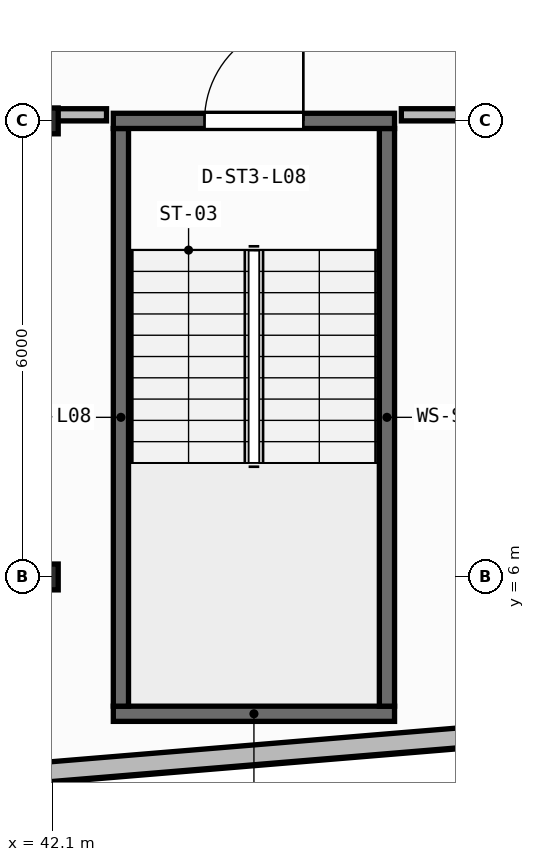
"""IFC4 building model, lengths in metres.
Left out: names, types, materials, properties, quantities, classifications, styles, units other than length and angle.
Written with IfcOpenShell. Run it as: python <this file> out.ifc"""

import sys

from ifc_helpers import new_model, si_unit, direction, frame, frame_2d, origin, origin_2d, place, context, subcontext, project, spatial, rectangle, i_section, extrude, element, fill, save


model = new_model("IFC4")
c1 = context("Model", 3, precision=1e-05, world=origin(), true_north=direction((0.0, 1.0)))
c2 = subcontext(c1, "Body", "Model", "MODEL_VIEW")
j1 = project(units=[si_unit("LENGTHUNIT", "METRE"), si_unit("PLANEANGLEUNIT", "RADIAN")], contexts=[c1])
p1 = place(None, origin())
s1 = spatial("IfcSite", under=j1, at=p1, CompositionType="ELEMENT")
p2 = place(p1, origin())
s2 = spatial("IfcBuilding", under=s1, at=p2, CompositionType="ELEMENT")
p3 = place(p2, frame((0.0, 0.0, 34.35)))
s3 = spatial("IfcBuildingStorey", under=s2, at=p3, CompositionType="ELEMENT", Elevation=34.35)
for number, where, z_axis, x_axis in (
    (1, (42.0, 6.0, 0.0), (0.0, 0.0, 1.0), (1.0, 0.0, 0.0)),
    (2, (42.0, 12.0, 0.0), (0.0, 0.0, 1.0), (1.0, 0.0, 0.0)),
):
    element("IfcColumn", number, at=place(p3, frame(where, z_axis=z_axis, x_axis=x_axis)), inside=s3, PredefinedType="COLUMN", context=c2, shape_type="SweptSolid", body=[
        extrude(i_section(OverallWidth=0.35, OverallDepth=0.34, WebThickness=0.016, FlangeThickness=0.028, at=origin_2d()), origin(), (0.0, 0.0, 1.0), 3.95),
    ])
p4 = place(p3, frame((2.76, 0.174, 0.0), z_axis=(0.0, 0.0, 1.0), x_axis=(0.996571478456, 0.082736257641, 0.0)))
e3 = element("IfcWall", 3, at=p4, inside=s3, PredefinedType="STANDARD", context=c2, shape_type="SweptSolid", body=[
    extrude(rectangle(XDim=52.861, YDim=0.26, at=frame_2d((26.431, 0.0))), origin(), (0.0, 0.0, 1.0), 3.71),
])
p5 = place(p4, frame((25.231, 0.0, 0.9)))
e4 = element("IfcOpeningElement", 4, at=p5, cuts=e3, PredefinedType="OPENING", context=c2, shape_type="SweptSolid", body=[
    extrude(rectangle(XDim=2.4, YDim=1.65, at=frame_2d((1.2, 0.825))), frame((0.0, 0.14, 0.0), z_axis=(0.0, -1.0, 0.0), x_axis=(1.0, 0.0, 0.0)), (0.0, 0.0, 1.0), 0.28),
])
p6 = place(p3, frame((42.9, 4.2, 0.0), z_axis=(0.0, 0.0, 1.0), x_axis=(1.0, 0.0, 0.0)))
e5 = element("IfcWall", 5, at=p6, inside=s3, PredefinedType="SHEAR", context=c2, shape_type="SweptSolid", body=[
    extrude(rectangle(XDim=3.7, YDim=0.2, at=frame_2d((1.85, 0.0))), origin(), (0.0, 0.0, 1.0), 3.71),
])
for number, where, z_axis, x_axis in (
    (6, (43.0, 4.3, 0.0), (0.0, 0.0, 1.0), (0.0, 1.0, 0.0)),
    (7, (46.5, 4.3, 0.0), (0.0, 0.0, 1.0), (0.0, 1.0, 0.0)),
):
    element("IfcWall", number, at=place(p3, frame(where, z_axis=z_axis, x_axis=x_axis)), inside=s3, PredefinedType="SHEAR", context=c2, shape_type="SweptSolid", body=[
        extrude(rectangle(XDim=7.6, YDim=0.2, at=frame_2d((3.8, 0.0))), origin(), (0.0, 0.0, 1.0), 3.71),
    ])
p7 = place(p3, frame((42.9, 12.0, 0.0), z_axis=(0.0, 0.0, 1.0), x_axis=(1.0, 0.0, 0.0)))
e8 = element("IfcWall", 8, at=p7, inside=s3, PredefinedType="SHEAR", context=c2, shape_type="SweptSolid", body=[
    extrude(rectangle(XDim=3.7, YDim=0.2, at=frame_2d((1.85, 0.0))), origin(), (0.0, 0.0, 1.0), 3.71),
])
p8 = place(p7, frame((1.2, 0.0, 0.0)))
e9 = element("IfcOpeningElement", 9, at=p8, cuts=e8, PredefinedType="OPENING", context=c2, shape_type="SweptSolid", body=[
    extrude(rectangle(XDim=1.3, YDim=2.15, at=frame_2d((0.65, 1.075))), frame((0.0, 0.11, 0.0), z_axis=(0.0, -1.0, 0.0), x_axis=(1.0, 0.0, 0.0)), (0.0, 0.0, 1.0), 0.22),
])
p9 = place(p3, frame((31.63, 12.08, 0.0), z_axis=(0.0, 0.0, 1.0), x_axis=(1.0, 0.0, 0.0)))
e10 = element("IfcWall", 10, at=p9, inside=s3, PredefinedType="PARTITIONING", context=c2, shape_type="SweptSolid", body=[
    extrude(rectangle(XDim=11.181, YDim=0.16, at=frame_2d((5.59, 0.0))), origin(), (0.0, 0.0, 1.0), 3.073),
])
p10 = place(p3, frame((46.689, 12.08, 0.0), z_axis=(0.0, 0.0, 1.0), x_axis=(1.0, 0.0, 0.0)))
e11 = element("IfcWall", 11, at=p10, inside=s3, PredefinedType="PARTITIONING", context=c2, shape_type="SweptSolid", body=[
    extrude(rectangle(XDim=3.011, YDim=0.16, at=frame_2d((1.505, 0.0))), origin(), (0.0, 0.0, 1.0), 3.073),
])
p11 = place(p8, origin())
e12 = element("IfcDoor", 12, at=p11, inside=s3, OperationType="SINGLE_SWING_RIGHT", PredefinedType="DOOR", context=c2, shape_type="SweptSolid", body=[
    extrude(rectangle(XDim=1.3, YDim=2.15, at=frame_2d((0.65, 1.075))), frame((0.0, 0.025, 0.0), z_axis=(0.0, -1.0, 0.0), x_axis=(1.0, 0.0, 0.0)), (0.0, 0.0, 1.0), 0.05),
])
fill(e9, e12)
save(model, sys.argv[1])
